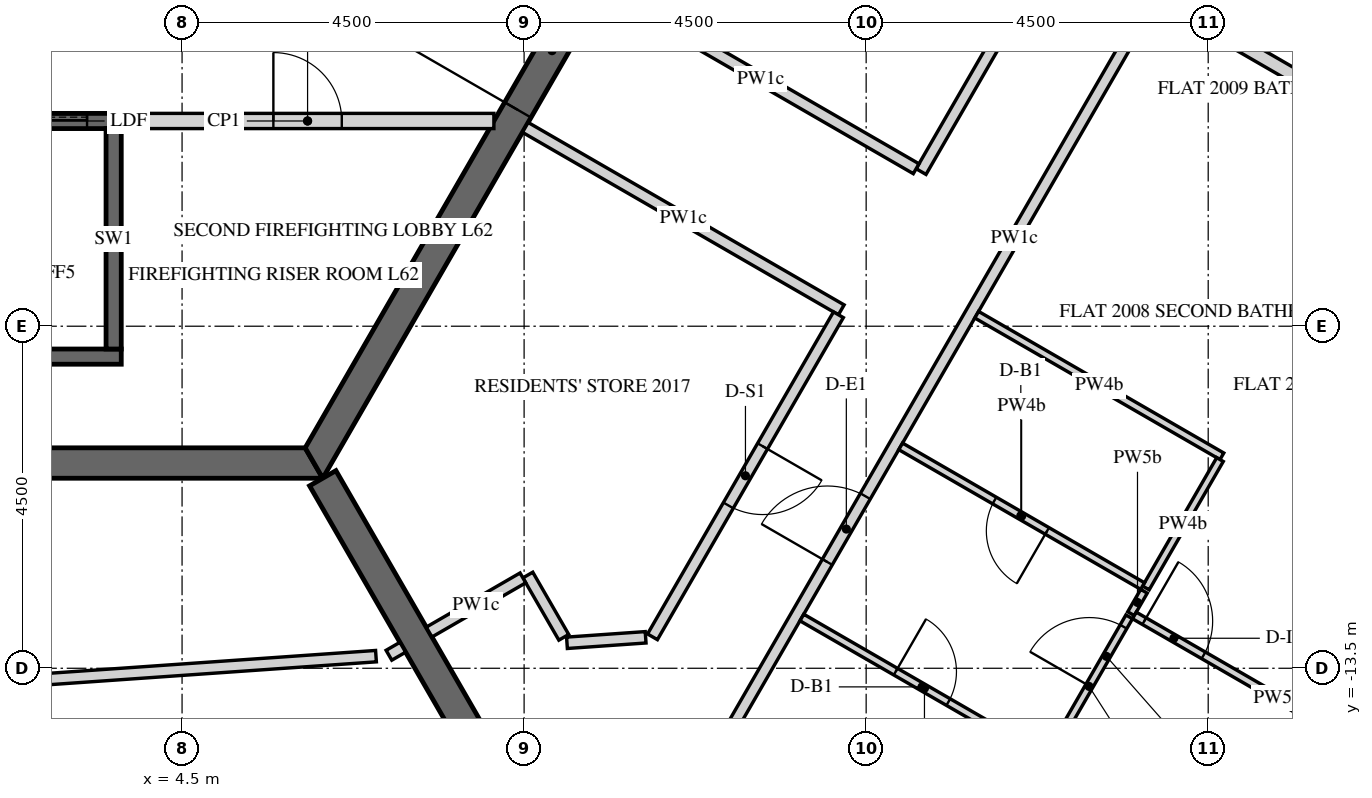
"""IFC4 building model, lengths in metres.
Left out: names, types, materials, properties, quantities, classifications, styles, units other than length and angle.
Written with IfcOpenShell. Run it as: python <this file> out.ifc"""

import sys

from ifc_helpers import new_model, si_unit, direction, frame, frame_2d, origin, place, context, subcontext, project, spatial, polyline, rectangle, outline, extrude, element, fill, save


model = new_model("IFC4")
c1 = context("Model", 3, precision=1e-05, world=origin(), true_north=direction((0.0, 1.0)))
c2 = subcontext(c1, "Body", "Model", "MODEL_VIEW")
j1 = project(units=[si_unit("LENGTHUNIT", "METRE"), si_unit("PLANEANGLEUNIT", "RADIAN")], contexts=[c1])
p1 = place(None, origin())
s1 = spatial("IfcSite", under=j1, at=p1, CompositionType="ELEMENT")
p2 = place(p1, origin())
s2 = spatial("IfcBuilding", under=s1, at=p2, CompositionType="ELEMENT")
p3 = place(p2, frame((0.0, 0.0, 260.1)))
s3 = spatial("IfcBuildingStorey", under=s2, at=p3, CompositionType="ELEMENT", Elevation=260.1)
p4 = place(p3, frame((16.451, -23.005, -0.15), z_axis=(0.0, 0.0, 1.0), x_axis=(0.500003737743, 0.866023245787, 0.0)))
e1 = element("IfcWall", 1, at=p4, inside=s3, PredefinedType="SOLIDWALL", context=c2, shape_type="SweptSolid", body=[
    extrude(outline(polyline([(-0.021, -0.25), (25.468, -0.25), (25.421, 0.25), (0.021, 0.25), (-0.021, -0.25)])), origin(), (0.0, 0.0, 1.0), 3.9),
])
p5 = place(p4, frame((2.522, 0.0, 0.75)))
e2 = element("IfcOpeningElement", 2, at=p5, cuts=e1, PredefinedType="OPENING", context=c2, shape_type="SweptSolid", body=[
    extrude(rectangle(XDim=2.4, YDim=2.7, at=frame_2d((1.2, 1.35))), frame((0.0, 0.26, 0.0), z_axis=(0.0, -1.0, 0.0), x_axis=(1.0, 0.0, 0.0)), (0.0, 0.0, 1.0), 0.52),
])
p6 = place(p4, frame((6.122, 0.0, 0.75)))
e3 = element("IfcOpeningElement", 3, at=p6, cuts=e1, PredefinedType="OPENING", context=c2, shape_type="SweptSolid", body=[
    extrude(rectangle(XDim=2.4, YDim=2.7, at=frame_2d((1.2, 1.35))), frame((0.0, 0.26, 0.0), z_axis=(0.0, -1.0, 0.0), x_axis=(1.0, 0.0, 0.0)), (0.0, 0.0, 1.0), 0.52),
])
p7 = place(p4, frame((9.722, 0.0, 0.75)))
e4 = element("IfcOpeningElement", 4, at=p7, cuts=e1, PredefinedType="OPENING", context=c2, shape_type="SweptSolid", body=[
    extrude(rectangle(XDim=2.4, YDim=2.7, at=frame_2d((1.2, 1.35))), frame((0.0, 0.26, 0.0), z_axis=(0.0, -1.0, 0.0), x_axis=(1.0, 0.0, 0.0)), (0.0, 0.0, 1.0), 0.52),
])
p8 = place(p4, frame((13.323, 0.0, 0.75)))
e5 = element("IfcOpeningElement", 5, at=p8, cuts=e1, PredefinedType="OPENING", context=c2, shape_type="SweptSolid", body=[
    extrude(rectangle(XDim=2.4, YDim=2.7, at=frame_2d((1.2, 1.35))), frame((0.0, 0.26, 0.0), z_axis=(0.0, -1.0, 0.0), x_axis=(1.0, 0.0, 0.0)), (0.0, 0.0, 1.0), 0.52),
])
p9 = place(p4, frame((16.922, 0.0, 0.75)))
e6 = element("IfcOpeningElement", 6, at=p9, cuts=e1, PredefinedType="OPENING", context=c2, shape_type="SweptSolid", body=[
    extrude(rectangle(XDim=2.4, YDim=2.7, at=frame_2d((1.2, 1.35))), frame((0.0, 0.26, 0.0), z_axis=(0.0, -1.0, 0.0), x_axis=(1.0, 0.0, 0.0)), (0.0, 0.0, 1.0), 0.52),
])
p10 = place(p4, frame((20.522, 0.0, 0.75)))
e7 = element("IfcOpeningElement", 7, at=p10, cuts=e1, PredefinedType="OPENING", context=c2, shape_type="SweptSolid", body=[
    extrude(rectangle(XDim=2.4, YDim=2.7, at=frame_2d((1.2, 1.35))), frame((0.0, 0.26, 0.0), z_axis=(0.0, -1.0, 0.0), x_axis=(1.0, 0.0, 0.0)), (0.0, 0.0, 1.0), 0.52),
])
p11 = place(p3, frame((-6.235, -10.8, -0.15), z_axis=(0.0, 0.0, 1.0), x_axis=(1.0, 0.0, 0.0)))
e8 = element("IfcWall", 8, at=p11, inside=s3, PredefinedType="SHEAR", context=c2, shape_type="SweptSolid", body=[
    extrude(outline(polyline([(-0.115, -0.2), (12.586, -0.2), (12.355, 0.2), (0.115, 0.2), (-0.115, -0.2)])), origin(), (0.0, 0.0, 1.0), 3.9),
])
p12 = place(p3, frame((6.235, -10.8, -0.15), z_axis=(0.0, 0.0, 1.0), x_axis=(0.499996419489, 0.866027470984, 0.0)))
e9 = element("IfcWall", 9, at=p12, inside=s3, PredefinedType="SHEAR", context=c2, shape_type="SweptSolid", body=[
    extrude(outline(polyline([(-0.115, -0.2), (12.586, -0.2), (12.355, 0.2), (0.115, 0.2), (-0.115, -0.2)])), origin(), (0.0, 0.0, 1.0), 3.9),
])
p13 = place(p12, frame((5.364, 0.0, 0.15)))
e10 = element("IfcOpeningElement", 10, at=p13, cuts=e9, PredefinedType="OPENING", context=c2, shape_type="SweptSolid", body=[
    extrude(rectangle(XDim=1.8, YDim=2.4, at=frame_2d((0.9, 1.2))), frame((0.0, 0.21, 0.0), z_axis=(0.0, -1.0, 0.0), x_axis=(1.0, 0.0, 0.0)), (0.0, 0.0, 1.0), 0.42),
])
p14 = place(p3, frame((6.351, -11.0, -0.15), z_axis=(0.0, 0.0, 1.0), x_axis=(0.499998894578, -0.866026041999, 0.0)))
e11 = element("IfcWall", 11, at=p14, inside=s3, PredefinedType="SHEAR", context=c2, shape_type="SweptSolid", body=[
    extrude(rectangle(XDim=15.544, YDim=0.4, at=frame_2d((7.772, 0.0))), origin(), (0.0, 0.0, 1.0), 3.9),
])
p15 = place(p14, frame((6.872, 0.0, 0.15)))
e12 = element("IfcOpeningElement", 12, at=p15, cuts=e11, PredefinedType="OPENING", context=c2, shape_type="SweptSolid", body=[
    extrude(rectangle(XDim=1.8, YDim=2.4, at=frame_2d((0.9, 1.2))), frame((0.0, 0.21, 0.0), z_axis=(0.0, -1.0, 0.0), x_axis=(1.0, 0.0, 0.0)), (0.0, 0.0, 1.0), 0.42),
])
p16 = place(p3, frame((-5.5, -6.3, -0.25), z_axis=(0.0, 0.0, 1.0), x_axis=(1.0, 0.0, 0.0)))
e13 = element("IfcWall", 13, at=p16, inside=s3, PredefinedType="SHEAR", context=c2, shape_type="SweptSolid", body=[
    extrude(rectangle(XDim=9.2, YDim=0.2, at=frame_2d((4.6, 0.0))), origin(), (0.0, 0.0, 1.0), 3.9),
])
p17 = place(p16, frame((0.45, 0.0, 0.25)))
e14 = element("IfcOpeningElement", 14, at=p17, cuts=e13, PredefinedType="OPENING", context=c2, shape_type="SweptSolid", body=[
    extrude(rectangle(XDim=1.1, YDim=2.1, at=frame_2d((0.55, 1.05))), frame((0.0, 0.11, 0.0), z_axis=(0.0, -1.0, 0.0), x_axis=(1.0, 0.0, 0.0)), (0.0, 0.0, 1.0), 0.22),
])
p18 = place(p16, frame((2.25, 0.0, 0.25)))
e15 = element("IfcOpeningElement", 15, at=p18, cuts=e13, PredefinedType="OPENING", context=c2, shape_type="SweptSolid", body=[
    extrude(rectangle(XDim=1.1, YDim=2.1, at=frame_2d((0.55, 1.05))), frame((0.0, 0.11, 0.0), z_axis=(0.0, -1.0, 0.0), x_axis=(1.0, 0.0, 0.0)), (0.0, 0.0, 1.0), 0.22),
])
p19 = place(p16, frame((4.05, 0.0, 0.25)))
e16 = element("IfcOpeningElement", 16, at=p19, cuts=e13, PredefinedType="OPENING", context=c2, shape_type="SweptSolid", body=[
    extrude(rectangle(XDim=1.1, YDim=2.1, at=frame_2d((0.55, 1.05))), frame((0.0, 0.11, 0.0), z_axis=(0.0, -1.0, 0.0), x_axis=(1.0, 0.0, 0.0)), (0.0, 0.0, 1.0), 0.22),
])
p20 = place(p16, frame((5.85, 0.0, 0.25)))
e17 = element("IfcOpeningElement", 17, at=p20, cuts=e13, PredefinedType="OPENING", context=c2, shape_type="SweptSolid", body=[
    extrude(rectangle(XDim=1.1, YDim=2.1, at=frame_2d((0.55, 1.05))), frame((0.0, 0.11, 0.0), z_axis=(0.0, -1.0, 0.0), x_axis=(1.0, 0.0, 0.0)), (0.0, 0.0, 1.0), 0.22),
])
p21 = place(p16, frame((7.65, 0.0, 0.25)))
e18 = element("IfcOpeningElement", 18, at=p21, cuts=e13, PredefinedType="OPENING", context=c2, shape_type="SweptSolid", body=[
    extrude(rectangle(XDim=1.1, YDim=2.1, at=frame_2d((0.55, 1.05))), frame((0.0, 0.11, 0.0), z_axis=(0.0, -1.0, 0.0), x_axis=(1.0, 0.0, 0.0)), (0.0, 0.0, 1.0), 0.22),
])
p22 = place(p3, frame((-5.5, -9.4, -0.25), z_axis=(0.0, 0.0, 1.0), x_axis=(1.0, 0.0, 0.0)))
e19 = element("IfcWall", 19, at=p22, inside=s3, PredefinedType="SHEAR", context=c2, shape_type="SweptSolid", body=[
    extrude(rectangle(XDim=9.2, YDim=0.2, at=frame_2d((4.6, 0.0))), origin(), (0.0, 0.0, 1.0), 3.9),
])
p23 = place(p3, frame((3.6, -9.3, -0.25), z_axis=(0.0, 0.0, 1.0), x_axis=(0.0, 1.0, 0.0)))
e20 = element("IfcWall", 20, at=p23, inside=s3, PredefinedType="SHEAR", context=c2, shape_type="SweptSolid", body=[
    extrude(rectangle(XDim=2.9, YDim=0.2, at=frame_2d((1.45, 0.0))), origin(), (0.0, 0.0, 1.0), 3.9),
])
p24 = place(p3, frame((3.7, -6.3, 0.0), z_axis=(0.0, 0.0, 1.0), x_axis=(1.0, 0.0, 0.0)))
e21 = element("IfcWall", 21, at=p24, inside=s3, PredefinedType="PARTITIONING", context=c2, shape_type="SweptSolid", body=[
    extrude(rectangle(XDim=4.903, YDim=0.2, at=frame_2d((2.451, 0.0))), origin(), (0.0, 0.0, 1.0), 3.65),
])
p25 = place(p24, frame((2.001, 0.0, 0.0)))
e22 = element("IfcOpeningElement", 22, at=p25, cuts=e21, PredefinedType="OPENING", context=c2, shape_type="SweptSolid", body=[
    extrude(rectangle(XDim=0.9, YDim=2.1, at=frame_2d((0.45, 1.05))), frame((0.0, 0.11, 0.0), z_axis=(0.0, -1.0, 0.0), x_axis=(1.0, 0.0, 0.0)), (0.0, 0.0, 1.0), 0.22),
])
p26 = place(p3, frame((7.404, -13.224, 0.0), z_axis=(0.0, 0.0, 1.0), x_axis=(-0.866088799389, -0.499890179513, 0.0)))
e23 = element("IfcWall", 23, at=p26, inside=s3, PredefinedType="PARTITIONING", context=c2, shape_type="SweptSolid", body=[
    extrude(rectangle(XDim=0.21, YDim=0.15, at=frame_2d((0.105, 0.0))), origin(), (0.0, 0.0, 1.0), 2.823),
])
p27 = place(p3, frame((7.051, -13.341, 0.0), z_axis=(0.0, 0.0, 1.0), x_axis=(-0.997563599815, -0.069762915103, 0.0)))
e24 = element("IfcWall", 24, at=p27, inside=s3, PredefinedType="PARTITIONING", context=c2, shape_type="SweptSolid", body=[
    extrude(rectangle(XDim=16.952, YDim=0.15, at=frame_2d((8.476, 0.0))), origin(), (0.0, 0.0, 1.0), 2.823),
])
p28 = place(p27, frame((8.026, 0.0, 0.0)))
e25 = element("IfcOpeningElement", 25, at=p28, cuts=e24, PredefinedType="OPENING", context=c2, shape_type="SweptSolid", body=[
    extrude(rectangle(XDim=0.9, YDim=2.1, at=frame_2d((0.45, 1.05))), frame((0.0, 0.085, 0.0), z_axis=(0.0, -1.0, 0.0), x_axis=(1.0, 0.0, 0.0)), (0.0, 0.0, 1.0), 0.17),
])
p29 = place(p3, frame((11.627, -14.462, 0.0), z_axis=(0.0, 0.0, 1.0), x_axis=(0.499994634027, 0.866028501808, 0.0)))
e26 = element("IfcWall", 26, at=p29, inside=s3, PredefinedType="PARTITIONING", context=c2, shape_type="SweptSolid", body=[
    extrude(rectangle(XDim=15.296, YDim=0.15, at=frame_2d((7.648, 0.0))), origin(), (0.0, 0.0, 1.0), 2.823),
])
p30 = place(p29, frame((2.725, 0.0, 0.0)))
e27 = element("IfcOpeningElement", 27, at=p30, cuts=e26, PredefinedType="OPENING", context=c2, shape_type="SweptSolid", body=[
    extrude(rectangle(XDim=1.0, YDim=2.1, at=frame_2d((0.5, 1.05))), frame((0.0, 0.085, 0.0), z_axis=(0.0, -1.0, 0.0), x_axis=(1.0, 0.0, 0.0)), (0.0, 0.0, 1.0), 0.17),
])
p31 = place(p29, frame((13.936, 0.0, 0.0)))
e28 = element("IfcOpeningElement", 28, at=p31, cuts=e26, PredefinedType="OPENING", context=c2, shape_type="SweptSolid", body=[
    extrude(rectangle(XDim=1.0, YDim=2.1, at=frame_2d((0.5, 1.05))), frame((0.0, 0.085, 0.0), z_axis=(0.0, -1.0, 0.0), x_axis=(1.0, 0.0, 0.0)), (0.0, 0.0, 1.0), 0.17),
])
p32 = place(p3, frame((17.465, -1.349, 0.0), z_axis=(0.0, 0.0, 1.0), x_axis=(-0.500001610943, -0.866024473704, 0.0)))
e29 = element("IfcWall", 29, at=p32, inside=s3, PredefinedType="PARTITIONING", context=c2, shape_type="SweptSolid", body=[
    extrude(rectangle(XDim=6.485, YDim=0.15, at=frame_2d((3.243, 0.0))), origin(), (0.0, 0.0, 1.0), 2.823),
])
p33 = place(p3, frame((14.158, -6.928, 0.0), z_axis=(0.0, 0.0, 1.0), x_axis=(-0.866024684746, 0.500001245408, 0.0)))
e30 = element("IfcWall", 30, at=p33, inside=s3, PredefinedType="PARTITIONING", context=c2, shape_type="SweptSolid", body=[
    extrude(rectangle(XDim=4.725, YDim=0.15, at=frame_2d((2.363, 0.0))), origin(), (0.0, 0.0, 1.0), 2.823),
])
p34 = place(p3, frame((9.016, -6.384, 0.0), z_axis=(0.0, 0.0, 1.0), x_axis=(0.866015339567, -0.500017431331, 0.0)))
e31 = element("IfcWall", 31, at=p34, inside=s3, PredefinedType="PARTITIONING", context=c2, shape_type="SweptSolid", body=[
    extrude(rectangle(XDim=4.8, YDim=0.15, at=frame_2d((2.4, 0.0))), origin(), (0.0, 0.0, 1.0), 2.823),
])
p35 = place(p3, frame((13.135, -8.849, 0.0), z_axis=(0.0, 0.0, 1.0), x_axis=(-0.500024829938, -0.866011067739, 0.0)))
e32 = element("IfcWall", 32, at=p35, inside=s3, PredefinedType="PARTITIONING", context=c2, shape_type="SweptSolid", body=[
    extrude(rectangle(XDim=4.892, YDim=0.15, at=frame_2d((2.446, 0.0))), origin(), (0.0, 0.0, 1.0), 2.823),
])
p36 = place(p35, frame((1.996, 0.0, 0.0)))
e33 = element("IfcOpeningElement", 33, at=p36, cuts=e32, PredefinedType="OPENING", context=c2, shape_type="SweptSolid", body=[
    extrude(rectangle(XDim=0.9, YDim=2.1, at=frame_2d((0.45, 1.05))), frame((0.0, 0.085, 0.0), z_axis=(0.0, -1.0, 0.0), x_axis=(1.0, 0.0, 0.0)), (0.0, 0.0, 1.0), 0.17),
])
p37 = place(p3, frame((10.599, -13.093, 0.0), z_axis=(0.0, 0.0, 1.0), x_axis=(-0.99755453913, -0.069892356245, 0.0)))
e34 = element("IfcWall", 34, at=p37, inside=s3, PredefinedType="PARTITIONING", context=c2, shape_type="SweptSolid", body=[
    extrude(rectangle(XDim=1.037, YDim=0.15, at=frame_2d((0.519, 0.0))), origin(), (0.0, 0.0, 1.0), 2.823),
])
p38 = place(p3, frame((9.522, -13.093, 0.0), z_axis=(0.0, 0.0, 1.0), x_axis=(-0.499804398801, 0.866138304741, 0.0)))
e35 = element("IfcWall", 35, at=p38, inside=s3, PredefinedType="PARTITIONING", context=c2, shape_type="SweptSolid", body=[
    extrude(rectangle(XDim=0.946, YDim=0.15, at=frame_2d((0.473, 0.0))), origin(), (0.0, 0.0, 1.0), 2.823),
])
p39 = place(p3, frame((8.984, -12.311, 0.0), z_axis=(0.0, 0.0, 1.0), x_axis=(-0.866020080793, -0.500009219579, 0.0)))
e36 = element("IfcWall", 36, at=p39, inside=s3, PredefinedType="PARTITIONING", context=c2, shape_type="SweptSolid", body=[
    extrude(rectangle(XDim=1.425, YDim=0.15, at=frame_2d((0.712, 0.0))), origin(), (0.0, 0.0, 1.0), 2.823),
])
p40 = place(p3, frame((17.155, -12.487, 0.0), z_axis=(0.0, 0.0, 1.0), x_axis=(-0.499681137129, -0.866209421097, 0.0)))
e37 = element("IfcWall", 37, at=p40, inside=s3, PredefinedType="PARTITIONING", context=c2, shape_type="SweptSolid", body=[
    extrude(rectangle(XDim=0.341, YDim=0.1, at=frame_2d((0.17, 0.0))), origin(), (0.0, 0.0, 1.0), 2.823),
])
p41 = place(p3, frame((17.029, -12.805, 0.0), z_axis=(0.0, 0.0, 1.0), x_axis=(0.866027639635, -0.499996127374, 0.0)))
e38 = element("IfcWall", 38, at=p41, inside=s3, PredefinedType="PARTITIONING", context=c2, shape_type="SweptSolid", body=[
    extrude(rectangle(XDim=4.35, YDim=0.1, at=frame_2d((2.175, 0.0))), origin(), (0.0, 0.0, 1.0), 2.823),
])
p42 = place(p41, frame((0.15, 0.0, 0.0)))
e39 = element("IfcOpeningElement", 39, at=p42, cuts=e38, PredefinedType="OPENING", context=c2, shape_type="SweptSolid", body=[
    extrude(rectangle(XDim=0.9, YDim=2.1, at=frame_2d((0.45, 1.05))), frame((0.0, 0.06, 0.0), z_axis=(0.0, -1.0, 0.0), x_axis=(1.0, 0.0, 0.0)), (0.0, 0.0, 1.0), 0.12),
])
p43 = place(p3, frame((14.954, -8.849, 0.0), z_axis=(0.0, 0.0, 1.0), x_axis=(0.866028424924, -0.499994767197, 0.0)))
e40 = element("IfcWall", 40, at=p43, inside=s3, PredefinedType="PARTITIONING", context=c2, shape_type="SweptSolid", body=[
    extrude(rectangle(XDim=3.725, YDim=0.1, at=frame_2d((1.863, 0.0))), origin(), (0.0, 0.0, 1.0), 2.823),
])
p44 = place(p3, frame((18.155, -10.754, 0.0), z_axis=(0.0, 0.0, 1.0), x_axis=(-0.49989585183, -0.866085525409, 0.0)))
e41 = element("IfcWall", 41, at=p44, inside=s3, PredefinedType="PARTITIONING", context=c2, shape_type="SweptSolid", body=[
    extrude(rectangle(XDim=1.95, YDim=0.1, at=frame_2d((0.975, 0.0))), origin(), (0.0, 0.0, 1.0), 2.823),
])
p45 = place(p3, frame((24.396, -8.745, 0.0), z_axis=(0.0, 0.0, 1.0), x_axis=(-0.866022959057, 0.500004234368, 0.0)))
e42 = element("IfcWall", 42, at=p45, inside=s3, PredefinedType="PARTITIONING", context=c2, shape_type="SweptSolid", body=[
    extrude(rectangle(XDim=8.125, YDim=0.18, at=frame_2d((4.062, 0.0))), origin(), (0.0, 0.0, 1.0), 2.823),
])
p46 = place(p3, frame((12.654, -12.833, 0.0), z_axis=(0.0, 0.0, 1.0), x_axis=(0.866056803351, -0.499945610411, 0.0)))
e43 = element("IfcWall", 43, at=p46, inside=s3, PredefinedType="PARTITIONING", context=c2, shape_type="SweptSolid", body=[
    extrude(rectangle(XDim=3.725, YDim=0.1, at=frame_2d((1.863, 0.0))), origin(), (0.0, 0.0, 1.0), 2.823),
])
p47 = place(p46, frame((1.425, 0.0, 0.0)))
e44 = element("IfcOpeningElement", 44, at=p47, cuts=e43, PredefinedType="OPENING", context=c2, shape_type="SweptSolid", body=[
    extrude(rectangle(XDim=0.8, YDim=2.1, at=frame_2d((0.4, 1.05))), frame((0.0, 0.06, 0.0), z_axis=(0.0, -1.0, 0.0), x_axis=(1.0, 0.0, 0.0)), (0.0, 0.0, 1.0), 0.12),
])
p48 = place(p3, frame((15.904, -14.653, 0.0), z_axis=(0.0, 0.0, 1.0), x_axis=(0.499979177903, 0.866037425094, 0.0)))
e45 = element("IfcWall", 45, at=p48, inside=s3, PredefinedType="PARTITIONING", context=c2, shape_type="SweptSolid", body=[
    extrude(rectangle(XDim=2.113, YDim=0.1, at=frame_2d((1.056, 0.0))), origin(), (0.0, 0.0, 1.0), 2.823),
])
p49 = place(p48, frame((1.063, 0.0, 0.0)))
e46 = element("IfcOpeningElement", 46, at=p49, cuts=e45, PredefinedType="OPENING", context=c2, shape_type="SweptSolid", body=[
    extrude(rectangle(XDim=0.9, YDim=2.1, at=frame_2d((0.45, 1.05))), frame((0.0, 0.06, 0.0), z_axis=(0.0, -1.0, 0.0), x_axis=(1.0, 0.0, 0.0)), (0.0, 0.0, 1.0), 0.12),
])
p50 = place(p3, frame((17.137, -12.418, 0.0), z_axis=(0.0, 0.0, 1.0), x_axis=(-0.866035129944, 0.499983153418, 0.0)))
e47 = element("IfcWall", 47, at=p50, inside=s3, PredefinedType="PARTITIONING", context=c2, shape_type="SweptSolid", body=[
    extrude(rectangle(XDim=3.675, YDim=0.1, at=frame_2d((1.837, 0.0))), origin(), (0.0, 0.0, 1.0), 2.823),
])
p51 = place(p50, frame((1.45, 0.0, 0.0)))
e48 = element("IfcOpeningElement", 48, at=p51, cuts=e47, PredefinedType="OPENING", context=c2, shape_type="SweptSolid", body=[
    extrude(rectangle(XDim=0.8, YDim=2.1, at=frame_2d((0.4, 1.05))), frame((0.0, 0.06, 0.0), z_axis=(0.0, -1.0, 0.0), x_axis=(1.0, 0.0, 0.0)), (0.0, 0.0, 1.0), 0.12),
])
p52 = place(p13, origin())
e49 = element("IfcDoor", 49, at=p52, inside=s3, OperationType="DOUBLE_DOOR_SINGLE_SWING", PredefinedType="DOOR", context=c2, shape_type="SweptSolid", body=[
    extrude(rectangle(XDim=1.8, YDim=2.4, at=frame_2d((0.9, 1.2))), frame((0.0, 0.025, 0.0), z_axis=(0.0, -1.0, 0.0), x_axis=(1.0, 0.0, 0.0)), (0.0, 0.0, 1.0), 0.05),
])
fill(e10, e49)
p53 = place(p25, origin())
e50 = element("IfcDoor", 50, at=p53, inside=s3, OperationType="SINGLE_SWING_LEFT", PredefinedType="DOOR", context=c2, shape_type="SweptSolid", body=[
    extrude(rectangle(XDim=0.9, YDim=2.1, at=frame_2d((0.45, 1.05))), frame((0.0, 0.025, 0.0), z_axis=(0.0, -1.0, 0.0), x_axis=(1.0, 0.0, 0.0)), (0.0, 0.0, 1.0), 0.05),
])
fill(e22, e50)
p54 = place(p21, origin())
e51 = element("IfcDoor", 51, at=p54, inside=s3, OperationType="SLIDING_TO_LEFT", PredefinedType="DOOR", context=c2, shape_type="SweptSolid", body=[
    extrude(rectangle(XDim=1.1, YDim=2.1, at=frame_2d((0.55, 1.05))), frame((0.0, 0.025, 0.0), z_axis=(0.0, -1.0, 0.0), x_axis=(1.0, 0.0, 0.0)), (0.0, 0.0, 1.0), 0.05),
])
fill(e18, e51)
p55 = place(p30, origin())
e52 = element("IfcDoor", 52, at=p55, inside=s3, OperationType="SINGLE_SWING_LEFT", PredefinedType="DOOR", context=c2, shape_type="SweptSolid", body=[
    extrude(rectangle(XDim=1.0, YDim=2.1, at=frame_2d((0.5, 1.05))), frame((0.0, 0.025, 0.0), z_axis=(0.0, -1.0, 0.0), x_axis=(1.0, 0.0, 0.0)), (0.0, 0.0, 1.0), 0.05),
])
fill(e27, e52)
p56 = place(p47, origin())
e53 = element("IfcDoor", 53, at=p56, inside=s3, OperationType="SINGLE_SWING_RIGHT", PredefinedType="DOOR", context=c2, shape_type="SweptSolid", body=[
    extrude(rectangle(XDim=0.8, YDim=2.1, at=frame_2d((0.4, 1.05))), frame((0.0, 0.025, 0.0), z_axis=(0.0, -1.0, 0.0), x_axis=(1.0, 0.0, 0.0)), (0.0, 0.0, 1.0), 0.05),
])
fill(e44, e53)
p57 = place(p49, origin())
e54 = element("IfcDoor", 54, at=p57, inside=s3, OperationType="SINGLE_SWING_RIGHT", PredefinedType="DOOR", context=c2, shape_type="SweptSolid", body=[
    extrude(rectangle(XDim=0.9, YDim=2.1, at=frame_2d((0.45, 1.05))), frame((0.0, 0.025, 0.0), z_axis=(0.0, -1.0, 0.0), x_axis=(1.0, 0.0, 0.0)), (0.0, 0.0, 1.0), 0.05),
])
fill(e46, e54)
p58 = place(p42, origin())
e55 = element("IfcDoor", 55, at=p58, inside=s3, OperationType="SINGLE_SWING_RIGHT", PredefinedType="DOOR", context=c2, shape_type="SweptSolid", body=[
    extrude(rectangle(XDim=0.9, YDim=2.1, at=frame_2d((0.45, 1.05))), frame((0.0, 0.025, 0.0), z_axis=(0.0, -1.0, 0.0), x_axis=(1.0, 0.0, 0.0)), (0.0, 0.0, 1.0), 0.05),
])
fill(e39, e55)
p59 = place(p51, origin())
e56 = element("IfcDoor", 56, at=p59, inside=s3, OperationType="SINGLE_SWING_RIGHT", PredefinedType="DOOR", context=c2, shape_type="SweptSolid", body=[
    extrude(rectangle(XDim=0.8, YDim=2.1, at=frame_2d((0.4, 1.05))), frame((0.0, 0.025, 0.0), z_axis=(0.0, -1.0, 0.0), x_axis=(1.0, 0.0, 0.0)), (0.0, 0.0, 1.0), 0.05),
])
fill(e48, e56)
p60 = place(p36, origin())
e57 = element("IfcDoor", 57, at=p60, inside=s3, OperationType="SINGLE_SWING_LEFT", PredefinedType="DOOR", context=c2, shape_type="SweptSolid", body=[
    extrude(rectangle(XDim=0.9, YDim=2.1, at=frame_2d((0.45, 1.05))), frame((0.0, 0.025, 0.0), z_axis=(0.0, -1.0, 0.0), x_axis=(1.0, 0.0, 0.0)), (0.0, 0.0, 1.0), 0.05),
])
fill(e33, e57)
save(model, sys.argv[1])
